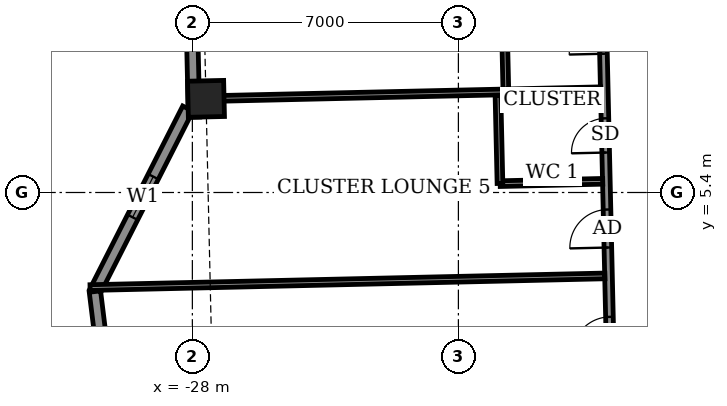
"""IFC4 building model, lengths in metres.
Left out: names, types, materials, properties, quantities, classifications, styles, units other than length and angle.
Written with IfcOpenShell. Run it as: python <this file> out.ifc"""

import sys

from ifc_helpers import new_model, si_unit, direction, frame, frame_2d, origin, origin_2d, place, context, subcontext, project, spatial, rectangle, extrude, element, fill, save


model = new_model("IFC4")
c1 = context("Model", 3, precision=1e-05, world=origin(), true_north=direction((0.0, 1.0)))
c2 = subcontext(c1, "Body", "Model", "MODEL_VIEW")
j1 = project(units=[si_unit("LENGTHUNIT", "METRE"), si_unit("PLANEANGLEUNIT", "RADIAN")], contexts=[c1])
p1 = place(None, origin())
s1 = spatial("IfcSite", under=j1, at=p1, CompositionType="ELEMENT")
p2 = place(p1, origin())
s2 = spatial("IfcBuilding", under=s1, at=p2, CompositionType="ELEMENT")
p3 = place(p2, frame((0.0, 0.0, 279.9)))
s3 = spatial("IfcBuildingStorey", under=s2, at=p3, CompositionType="ELEMENT", Elevation=279.9)
p4 = place(p3, frame((-27.641, 7.864, -0.55), z_axis=(0.0, 0.0, 1.0), x_axis=(0.022688048974, -0.999742593088, 0.0)))
e1 = element("IfcColumn", 1, at=p4, inside=s3, PredefinedType="COLUMN", context=c2, shape_type="SweptSolid", body=[
    extrude(rectangle(XDim=0.95, YDim=0.95, at=origin_2d()), origin(), (0.0, 0.0, 1.0), 3.6),
])
p5 = place(p3, frame((-28.297, 22.427, 0.0), z_axis=(0.0, 0.0, 1.0), x_axis=(0.022663916124, -0.999743140465, 0.0)))
e2 = element("IfcWall", 2, at=p5, inside=s3, PredefinedType="SOLIDWALL", context=c2, shape_type="SweptSolid", body=[
    extrude(rectangle(XDim=15.049, YDim=0.3, at=frame_2d((7.524, 0.0))), origin(), (0.0, 0.0, 1.0), 2.5),
])
p6 = place(p5, frame((3.002, 0.0, 0.0)))
e3 = element("IfcOpeningElement", 3, at=p6, cuts=e2, PredefinedType="OPENING", context=c2, shape_type="SweptSolid", body=[
    extrude(rectangle(XDim=1.5, YDim=2.4, at=frame_2d((0.75, 1.2))), frame((0.0, 0.16, 0.0), z_axis=(0.0, -1.0, 0.0), x_axis=(1.0, 0.0, 0.0)), (0.0, 0.0, 1.0), 0.32),
])
p7 = place(p5, frame((10.475, 0.0, 0.9)))
e4 = element("IfcOpeningElement", 4, at=p7, cuts=e2, PredefinedType="OPENING", context=c2, shape_type="SweptSolid", body=[
    extrude(rectangle(XDim=2.4, YDim=1.5, at=frame_2d((1.2, 0.75))), frame((0.0, 0.16, 0.0), z_axis=(0.0, -1.0, 0.0), x_axis=(1.0, 0.0, 0.0)), (0.0, 0.0, 1.0), 0.32),
])
p8 = place(p3, frame((-28.12, 7.608, 0.0), z_axis=(0.0, 0.0, 1.0), x_axis=(-0.45266802131, -0.891679125293, 0.0)))
e5 = element("IfcWall", 5, at=p8, inside=s3, PredefinedType="SOLIDWALL", context=c2, shape_type="SweptSolid", body=[
    extrude(rectangle(XDim=5.399, YDim=0.3, at=frame_2d((2.699, 0.0))), origin(), (0.0, 0.0, 1.0), 3.05),
])
p9 = place(p8, frame((2.008, 0.0, 0.9)))
e6 = element("IfcOpeningElement", 6, at=p9, cuts=e5, PredefinedType="OPENING", context=c2, shape_type="SweptSolid", body=[
    extrude(rectangle(XDim=1.2, YDim=1.5, at=frame_2d((0.6, 0.75))), frame((0.0, 0.16, 0.0), z_axis=(0.0, -1.0, 0.0), x_axis=(1.0, 0.0, 0.0)), (0.0, 0.0, 1.0), 0.32),
])
p10 = place(p3, frame((-30.564, 2.794, 0.0), z_axis=(0.0, 0.0, 1.0), x_axis=(0.122163831021, -0.992509948761, 0.0)))
e7 = element("IfcWall", 7, at=p10, inside=s3, PredefinedType="SOLIDWALL", context=c2, shape_type="SweptSolid", body=[
    extrude(rectangle(XDim=5.574, YDim=0.3, at=frame_2d((2.787, 0.0))), origin(), (0.0, 0.0, 1.0), 3.05),
])
p11 = place(p10, frame((2.187, 0.0, 0.9)))
e8 = element("IfcOpeningElement", 8, at=p11, cuts=e7, PredefinedType="OPENING", context=c2, shape_type="SweptSolid", body=[
    extrude(rectangle(XDim=1.2, YDim=1.5, at=frame_2d((0.6, 0.75))), frame((0.0, 0.16, 0.0), z_axis=(0.0, -1.0, 0.0), x_axis=(1.0, 0.0, 0.0)), (0.0, 0.0, 1.0), 0.32),
])
p12 = place(p3, frame((-30.736, 8.043, 0.0), z_axis=(0.0, 0.0, 1.0), x_axis=(-0.022681332769, 0.999742745482, 0.0)))
e9 = element("IfcWall", 9, at=p12, inside=s3, PredefinedType="USERDEFINED", context=c2, shape_type="SweptSolid", body=[
    extrude(rectangle(XDim=3.875, YDim=0.55, at=frame_2d((1.938, 0.0))), origin(), (0.0, 0.0, 1.0), 0.8),
])
p13 = place(p3, frame((-16.684, -12.919, 0.0), z_axis=(0.0, 0.0, 1.0), x_axis=(-0.022712214871, 0.999742044377, 0.0)))
e10 = element("IfcWall", 10, at=p13, inside=s3, PredefinedType="PARTITIONING", context=c2, shape_type="SweptSolid", body=[
    extrude(rectangle(XDim=26.551, YDim=0.2, at=frame_2d((13.275, 0.0))), origin(), (0.0, 0.0, 1.0), 3.05),
])
p14 = place(p13, frame((24.688, 0.0, 0.0)))
e11 = element("IfcOpeningElement", 11, at=p14, cuts=e10, PredefinedType="OPENING", context=c2, shape_type="SweptSolid", body=[
    extrude(rectangle(XDim=1.0, YDim=2.1, at=frame_2d((0.5, 1.05))), frame((0.0, 0.11, 0.0), z_axis=(0.0, -1.0, 0.0), x_axis=(1.0, 0.0, 0.0)), (0.0, 0.0, 1.0), 0.22),
])
p15 = place(p13, frame((21.975, 0.0, 0.0)))
e12 = element("IfcOpeningElement", 12, at=p15, cuts=e10, PredefinedType="OPENING", context=c2, shape_type="SweptSolid", body=[
    extrude(rectangle(XDim=0.9, YDim=2.1, at=frame_2d((0.45, 1.05))), frame((0.0, 0.11, 0.0), z_axis=(0.0, -1.0, 0.0), x_axis=(1.0, 0.0, 0.0)), (0.0, 0.0, 1.0), 0.22),
])
p16 = place(p13, frame((16.875, 0.0, 0.0)))
e13 = element("IfcOpeningElement", 13, at=p16, cuts=e10, PredefinedType="OPENING", context=c2, shape_type="SweptSolid", body=[
    extrude(rectangle(XDim=1.0, YDim=2.1, at=frame_2d((0.5, 1.05))), frame((0.0, 0.11, 0.0), z_axis=(0.0, -1.0, 0.0), x_axis=(1.0, 0.0, 0.0)), (0.0, 0.0, 1.0), 0.22),
])
p17 = place(p13, frame((19.375, 0.0, 0.0)))
e14 = element("IfcOpeningElement", 14, at=p17, cuts=e10, PredefinedType="OPENING", context=c2, shape_type="SweptSolid", body=[
    extrude(rectangle(XDim=0.9, YDim=2.1, at=frame_2d((0.45, 1.05))), frame((0.0, 0.11, 0.0), z_axis=(0.0, -1.0, 0.0), x_axis=(1.0, 0.0, 0.0)), (0.0, 0.0, 1.0), 0.22),
])
p18 = place(p13, frame((14.05, 0.0, 0.0)))
e15 = element("IfcOpeningElement", 15, at=p18, cuts=e10, PredefinedType="OPENING", context=c2, shape_type="SweptSolid", body=[
    extrude(rectangle(XDim=1.0, YDim=2.1, at=frame_2d((0.5, 1.05))), frame((0.0, 0.11, 0.0), z_axis=(0.0, -1.0, 0.0), x_axis=(1.0, 0.0, 0.0)), (0.0, 0.0, 1.0), 0.22),
])
p19 = place(p13, frame((11.225, 0.0, 0.0)))
e16 = element("IfcOpeningElement", 16, at=p19, cuts=e10, PredefinedType="OPENING", context=c2, shape_type="SweptSolid", body=[
    extrude(rectangle(XDim=0.9, YDim=2.1, at=frame_2d((0.45, 1.05))), frame((0.0, 0.11, 0.0), z_axis=(0.0, -1.0, 0.0), x_axis=(1.0, 0.0, 0.0)), (0.0, 0.0, 1.0), 0.22),
])
p20 = place(p13, frame((8.37, 0.0, 0.0)))
e17 = element("IfcOpeningElement", 17, at=p20, cuts=e10, PredefinedType="OPENING", context=c2, shape_type="SweptSolid", body=[
    extrude(rectangle(XDim=1.0, YDim=2.1, at=frame_2d((0.5, 1.05))), frame((0.0, 0.11, 0.0), z_axis=(0.0, -1.0, 0.0), x_axis=(1.0, 0.0, 0.0)), (0.0, 0.0, 1.0), 0.22),
])
p21 = place(p13, frame((5.263, 0.0, 0.0)))
e18 = element("IfcOpeningElement", 18, at=p21, cuts=e10, PredefinedType="OPENING", context=c2, shape_type="SweptSolid", body=[
    extrude(rectangle(XDim=1.0, YDim=2.1, at=frame_2d((0.5, 1.05))), frame((0.0, 0.11, 0.0), z_axis=(0.0, -1.0, 0.0), x_axis=(1.0, 0.0, 0.0)), (0.0, 0.0, 1.0), 0.22),
])
p22 = place(p13, frame((0.425, 0.0, 0.0)))
e19 = element("IfcOpeningElement", 19, at=p22, cuts=e10, PredefinedType="OPENING", context=c2, shape_type="SweptSolid", body=[
    extrude(rectangle(XDim=1.0, YDim=2.1, at=frame_2d((0.5, 1.05))), frame((0.0, 0.11, 0.0), z_axis=(0.0, -1.0, 0.0), x_axis=(1.0, 0.0, 0.0)), (0.0, 0.0, 1.0), 0.22),
])
p23 = place(p13, frame((2.6, 0.0, 0.0)))
e20 = element("IfcOpeningElement", 20, at=p23, cuts=e10, PredefinedType="OPENING", context=c2, shape_type="SweptSolid", body=[
    extrude(rectangle(XDim=0.9, YDim=2.1, at=frame_2d((0.45, 1.05))), frame((0.0, 0.11, 0.0), z_axis=(0.0, -1.0, 0.0), x_axis=(1.0, 0.0, 0.0)), (0.0, 0.0, 1.0), 0.22),
])
p24 = place(p3, frame((-30.692, 2.898, 0.0), z_axis=(0.0, 0.0, 1.0), x_axis=(0.999743099019, 0.022665744279, 0.0)))
e21 = element("IfcWall", 21, at=p24, inside=s3, PredefinedType="PARTITIONING", context=c2, shape_type="SweptSolid", body=[
    extrude(rectangle(XDim=13.55, YDim=0.15, at=frame_2d((6.775, 0.0))), origin(), (0.0, 0.0, 1.0), 2.05),
])
p25 = place(p3, frame((-19.901, 5.633, 0.0), z_axis=(0.0, 0.0, 1.0), x_axis=(0.999744396973, 0.02260842146, 0.0)))
e22 = element("IfcWall", 22, at=p25, inside=s3, PredefinedType="PARTITIONING", context=c2, shape_type="SweptSolid", body=[
    extrude(rectangle(XDim=2.7, YDim=0.15, at=frame_2d((1.35, 0.0))), origin(), (0.0, 0.0, 1.0), 3.05),
])
p26 = place(p3, frame((-19.906, 5.638, 0.0), z_axis=(0.0, 0.0, 1.0), x_axis=(-0.022781023197, 0.999740478815, 0.0)))
e23 = element("IfcWall", 23, at=p26, inside=s3, PredefinedType="PARTITIONING", context=c2, shape_type="SweptSolid", body=[
    extrude(rectangle(XDim=2.325, YDim=0.15, at=frame_2d((1.163, 0.0))), origin(), (0.0, 0.0, 1.0), 3.05),
])
p27 = place(p3, frame((-19.752, 8.117, 0.0), z_axis=(0.0, 0.0, 1.0), x_axis=(-0.022749889061, 0.999741187782, 0.0)))
e24 = element("IfcWall", 24, at=p27, inside=s3, PredefinedType="PARTITIONING", context=c2, shape_type="SweptSolid", body=[
    extrude(rectangle(XDim=2.726, YDim=0.15, at=frame_2d((1.363, 0.0))), origin(), (0.0, 0.0, 1.0), 3.05),
])
p28 = place(p3, frame((-27.817, 7.864, 0.0), z_axis=(0.0, 0.0, 1.0), x_axis=(0.9997418952, 0.022718780382, 0.0)))
e25 = element("IfcWall", 25, at=p28, inside=s3, PredefinedType="PARTITIONING", context=c2, shape_type="SweptSolid", body=[
    extrude(rectangle(XDim=10.563, YDim=0.15, at=frame_2d((5.282, 0.0))), origin(), (0.0, 0.0, 1.0), 3.05),
])
p29 = place(p9, origin())
e26 = element("IfcWindow", 26, at=p29, inside=s3, PartitioningType="SINGLE_PANEL", PredefinedType="WINDOW", context=c2, shape_type="SweptSolid", body=[
    extrude(rectangle(XDim=1.2, YDim=1.5, at=frame_2d((0.6, 0.75))), frame((0.0, 0.03, 0.0), z_axis=(0.0, -1.0, 0.0), x_axis=(1.0, 0.0, 0.0)), (0.0, 0.0, 1.0), 0.06),
])
fill(e6, e26)
p30 = place(p15, origin())
e27 = element("IfcDoor", 27, at=p30, inside=s3, OperationType="SINGLE_SWING_RIGHT", PredefinedType="DOOR", context=c2, shape_type="SweptSolid", body=[
    extrude(rectangle(XDim=0.9, YDim=2.1, at=frame_2d((0.45, 1.05))), frame((0.0, 0.025, 0.0), z_axis=(0.0, -1.0, 0.0), x_axis=(1.0, 0.0, 0.0)), (0.0, 0.0, 1.0), 0.05),
])
fill(e12, e27)
p31 = place(p16, origin())
e28 = element("IfcDoor", 28, at=p31, inside=s3, OperationType="SINGLE_SWING_RIGHT", PredefinedType="DOOR", context=c2, shape_type="SweptSolid", body=[
    extrude(rectangle(XDim=1.0, YDim=2.1, at=frame_2d((0.5, 1.05))), frame((0.0, 0.025, 0.0), z_axis=(0.0, -1.0, 0.0), x_axis=(1.0, 0.0, 0.0)), (0.0, 0.0, 1.0), 0.05),
])
fill(e13, e28)
p32 = place(p17, origin())
e29 = element("IfcDoor", 29, at=p32, inside=s3, OperationType="SINGLE_SWING_LEFT", PredefinedType="DOOR", context=c2, shape_type="SweptSolid", body=[
    extrude(rectangle(XDim=0.9, YDim=2.1, at=frame_2d((0.45, 1.05))), frame((0.0, 0.025, 0.0), z_axis=(0.0, -1.0, 0.0), x_axis=(1.0, 0.0, 0.0)), (0.0, 0.0, 1.0), 0.05),
])
fill(e14, e29)
p33 = place(p18, origin())
e30 = element("IfcDoor", 30, at=p33, inside=s3, OperationType="SINGLE_SWING_LEFT", PredefinedType="DOOR", context=c2, shape_type="SweptSolid", body=[
    extrude(rectangle(XDim=1.0, YDim=2.1, at=frame_2d((0.5, 1.05))), frame((0.0, 0.025, 0.0), z_axis=(0.0, -1.0, 0.0), x_axis=(1.0, 0.0, 0.0)), (0.0, 0.0, 1.0), 0.05),
])
fill(e15, e30)
save(model, sys.argv[1])
